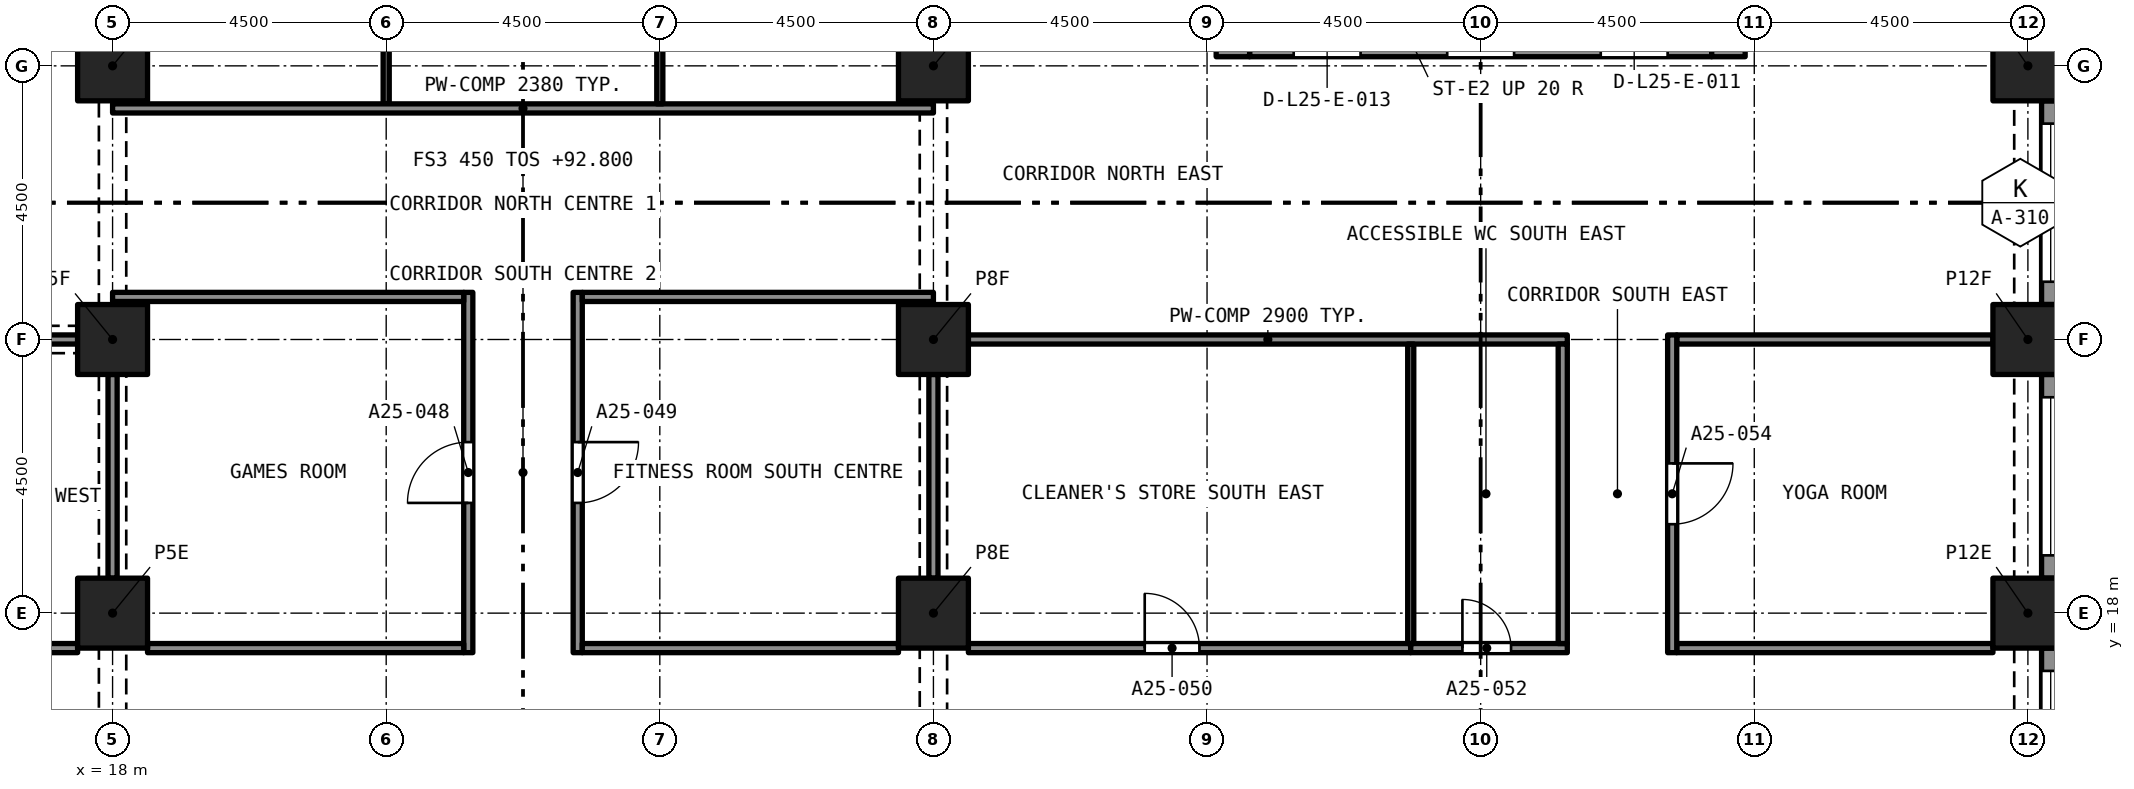
"""IFC4 building model, lengths in metres.
Left out: names, types, materials, properties, quantities, classifications, styles, units other than length and angle.
Written with IfcOpenShell. Run it as: python <this file> out.ifc"""

import sys

from ifc_helpers import new_model, si_unit, direction, frame, frame_2d, origin, origin_2d, place, context, subcontext, project, spatial, rectangle, extrude, element, fill, save


model = new_model("IFC4")
c1 = context("Model", 3, precision=1e-05, world=origin(), true_north=direction((0.0, 1.0)))
c2 = subcontext(c1, "Body", "Model", "MODEL_VIEW")
j1 = project(units=[si_unit("LENGTHUNIT", "METRE"), si_unit("PLANEANGLEUNIT", "RADIAN")], contexts=[c1])
p1 = place(None, origin())
s1 = spatial("IfcSite", under=j1, at=p1, CompositionType="ELEMENT")
p2 = place(p1, origin())
s2 = spatial("IfcBuilding", under=s1, at=p2, CompositionType="ELEMENT")
p3 = place(p2, frame((0.0, 0.0, 92.8)))
s3 = spatial("IfcBuildingStorey", under=s2, at=p3, CompositionType="ELEMENT", Elevation=92.8)
for number, where, z_axis, x_axis in (
    (1, (18.0, 18.0, 0.0), (0.0, 0.0, 1.0), (1.0, 0.0, 0.0)),
    (2, (31.5, 18.0, 0.0), (0.0, 0.0, 1.0), (1.0, 0.0, 0.0)),
    (3, (49.5, 18.0, 0.0), (0.0, 0.0, 1.0), (1.0, 0.0, 0.0)),
    (4, (18.0, 22.5, 0.0), (0.0, 0.0, 1.0), (1.0, 0.0, 0.0)),
    (5, (31.5, 22.5, 0.0), (0.0, 0.0, 1.0), (1.0, 0.0, 0.0)),
    (6, (49.5, 22.5, 0.0), (0.0, 0.0, 1.0), (1.0, 0.0, 0.0)),
    (7, (18.0, 27.0, 0.0), (0.0, 0.0, 1.0), (1.0, 0.0, 0.0)),
    (8, (31.5, 27.0, 0.0), (0.0, 0.0, 1.0), (1.0, 0.0, 0.0)),
    (9, (49.5, 27.0, 0.0), (0.0, 0.0, 1.0), (1.0, 0.0, 0.0)),
):
    element("IfcColumn", number, at=place(p3, frame(where, z_axis=z_axis, x_axis=x_axis)), inside=s3, PredefinedType="COLUMN", context=c2, shape_type="SweptSolid", body=[
        extrude(rectangle(XDim=1.15, YDim=1.15, at=origin_2d()), origin(), (0.0, 0.0, 1.0), 3.2),
    ])
p4 = place(p3, frame((36.7, 27.425, 0.0), z_axis=(0.0, 0.0, 1.0), x_axis=(1.0, 0.0, 0.0)))
e10 = element("IfcWall", 10, at=p4, inside=s3, PredefinedType="SOLIDWALL", context=c2, shape_type="SweptSolid", body=[
    extrude(rectangle(XDim=7.6, YDim=0.55, at=frame_2d((3.8, 0.0))), origin(), (0.0, 0.0, 1.0), 3.2),
])
p5 = place(p4, frame((5.775, 0.0, 0.0)))
e11 = element("IfcOpeningElement", 11, at=p5, cuts=e10, PredefinedType="OPENING", context=c2, shape_type="SweptSolid", body=[
    extrude(rectangle(XDim=1.1, YDim=2.1, at=frame_2d((0.55, 1.05))), frame((0.0, 0.285, 0.0), z_axis=(0.0, -1.0, 0.0), x_axis=(1.0, 0.0, 0.0)), (0.0, 0.0, 1.0), 0.57),
])
p6 = place(p4, frame((3.25, 0.0, 0.0)))
e12 = element("IfcOpeningElement", 12, at=p6, cuts=e10, PredefinedType="OPENING", context=c2, shape_type="SweptSolid", body=[
    extrude(rectangle(XDim=1.1, YDim=2.1, at=frame_2d((0.55, 1.05))), frame((0.0, 0.285, 0.0), z_axis=(0.0, -1.0, 0.0), x_axis=(1.0, 0.0, 0.0)), (0.0, 0.0, 1.0), 0.57),
])
p7 = place(p4, frame((0.725, 0.0, 0.0)))
e13 = element("IfcOpeningElement", 13, at=p7, cuts=e10, PredefinedType="OPENING", context=c2, shape_type="SweptSolid", body=[
    extrude(rectangle(XDim=1.1, YDim=2.1, at=frame_2d((0.55, 1.05))), frame((0.0, 0.285, 0.0), z_axis=(0.0, -1.0, 0.0), x_axis=(1.0, 0.0, 0.0)), (0.0, 0.0, 1.0), 0.57),
])
p8 = place(p3, frame((36.425, 27.15, 0.0), z_axis=(0.0, 0.0, 1.0), x_axis=(0.0, 1.0, 0.0)))
e14 = element("IfcWall", 14, at=p8, inside=s3, PredefinedType="SOLIDWALL", context=c2, shape_type="SweptSolid", body=[
    extrude(rectangle(XDim=13.2, YDim=0.55, at=frame_2d((6.6, 0.0))), origin(), (0.0, 0.0, 1.0), 3.2),
])
p9 = place(p8, frame((8.8, 0.0, 0.0)))
e15 = element("IfcOpeningElement", 15, at=p9, cuts=e14, PredefinedType="OPENING", context=c2, shape_type="SweptSolid", body=[
    extrude(rectangle(XDim=1.2, YDim=2.1, at=frame_2d((0.6, 1.05))), frame((0.0, 0.285, 0.0), z_axis=(0.0, -1.0, 0.0), x_axis=(1.0, 0.0, 0.0)), (0.0, 0.0, 1.0), 0.57),
])
p10 = place(p3, frame((44.575, 27.15, 0.0), z_axis=(0.0, 0.0, 1.0), x_axis=(0.0, 1.0, 0.0)))
e16 = element("IfcWall", 16, at=p10, inside=s3, PredefinedType="SOLIDWALL", context=c2, shape_type="SweptSolid", body=[
    extrude(rectangle(XDim=13.2, YDim=0.55, at=frame_2d((6.6, 0.0))), origin(), (0.0, 0.0, 1.0), 3.2),
])
p11 = place(p10, frame((8.8, 0.0, 0.0)))
e17 = element("IfcOpeningElement", 17, at=p11, cuts=e16, PredefinedType="OPENING", context=c2, shape_type="SweptSolid", body=[
    extrude(rectangle(XDim=1.2, YDim=2.1, at=frame_2d((0.6, 1.05))), frame((0.0, 0.285, 0.0), z_axis=(0.0, -1.0, 0.0), x_axis=(1.0, 0.0, 0.0)), (0.0, 0.0, 1.0), 0.57),
])
p12 = place(p3, frame((49.875, 17.425, 0.0), z_axis=(0.0, 0.0, 1.0), x_axis=(0.0, -1.0, 0.0)))
e18 = element("IfcWall", 18, at=p12, inside=s3, PredefinedType="SOLIDWALL", context=c2, shape_type="SweptSolid", body=[
    extrude(rectangle(XDim=3.35, YDim=0.3, at=frame_2d((1.675, 0.0))), origin(), (0.0, 0.0, 1.0), 3.2),
])
p13 = place(p12, frame((0.375, 0.0, 0.45)))
e19 = element("IfcOpeningElement", 19, at=p13, cuts=e18, PredefinedType="OPENING", context=c2, shape_type="SweptSolid", body=[
    extrude(rectangle(XDim=2.6, YDim=1.95, at=frame_2d((1.3, 0.975))), frame((0.0, 0.16, 0.0), z_axis=(0.0, -1.0, 0.0), x_axis=(1.0, 0.0, 0.0)), (0.0, 0.0, 1.0), 0.32),
])
p14 = place(p3, frame((49.875, 21.925, 0.0), z_axis=(0.0, 0.0, 1.0), x_axis=(0.0, -1.0, 0.0)))
e20 = element("IfcWall", 20, at=p14, inside=s3, PredefinedType="SOLIDWALL", context=c2, shape_type="SweptSolid", body=[
    extrude(rectangle(XDim=3.35, YDim=0.3, at=frame_2d((1.675, 0.0))), origin(), (0.0, 0.0, 1.0), 3.2),
])
p15 = place(p14, frame((0.375, 0.0, 0.45)))
e21 = element("IfcOpeningElement", 21, at=p15, cuts=e20, PredefinedType="OPENING", context=c2, shape_type="SweptSolid", body=[
    extrude(rectangle(XDim=2.6, YDim=1.95, at=frame_2d((1.3, 0.975))), frame((0.0, 0.16, 0.0), z_axis=(0.0, -1.0, 0.0), x_axis=(1.0, 0.0, 0.0)), (0.0, 0.0, 1.0), 0.32),
])
p16 = place(p3, frame((49.875, 26.425, 0.0), z_axis=(0.0, 0.0, 1.0), x_axis=(0.0, -1.0, 0.0)))
e22 = element("IfcWall", 22, at=p16, inside=s3, PredefinedType="SOLIDWALL", context=c2, shape_type="SweptSolid", body=[
    extrude(rectangle(XDim=3.35, YDim=0.3, at=frame_2d((1.675, 0.0))), origin(), (0.0, 0.0, 1.0), 3.2),
])
p17 = place(p16, frame((0.375, 0.0, 0.45)))
e23 = element("IfcOpeningElement", 23, at=p17, cuts=e22, PredefinedType="OPENING", context=c2, shape_type="SweptSolid", body=[
    extrude(rectangle(XDim=2.6, YDim=1.95, at=frame_2d((1.3, 0.975))), frame((0.0, 0.16, 0.0), z_axis=(0.0, -1.0, 0.0), x_axis=(1.0, 0.0, 0.0)), (0.0, 0.0, 1.0), 0.32),
])
p18 = place(p3, frame((23.85, 17.35, 0.0), z_axis=(0.0, 0.0, 1.0), x_axis=(0.0, 1.0, 0.0)))
e24 = element("IfcWall", 24, at=p18, inside=s3, PredefinedType="PARTITIONING", context=c2, shape_type="SweptSolid", body=[
    extrude(rectangle(XDim=5.925, YDim=0.15, at=frame_2d((2.962, 0.0))), origin(), (0.0, 0.0, 1.0), 2.75),
])
p19 = place(p18, frame((2.462, 0.0, 0.0)))
e25 = element("IfcOpeningElement", 25, at=p19, cuts=e24, PredefinedType="OPENING", context=c2, shape_type="SweptSolid", body=[
    extrude(rectangle(XDim=1.0, YDim=2.1, at=frame_2d((0.5, 1.05))), frame((0.0, 0.085, 0.0), z_axis=(0.0, -1.0, 0.0), x_axis=(1.0, 0.0, 0.0)), (0.0, 0.0, 1.0), 0.17),
])
p20 = place(p3, frame((25.65, 23.275, 0.0), z_axis=(0.0, 0.0, 1.0), x_axis=(0.0, -1.0, 0.0)))
e26 = element("IfcWall", 26, at=p20, inside=s3, PredefinedType="PARTITIONING", context=c2, shape_type="SweptSolid", body=[
    extrude(rectangle(XDim=5.925, YDim=0.15, at=frame_2d((2.962, 0.0))), origin(), (0.0, 0.0, 1.0), 2.75),
])
p21 = place(p20, frame((2.462, 0.0, 0.0)))
e27 = element("IfcOpeningElement", 27, at=p21, cuts=e26, PredefinedType="OPENING", context=c2, shape_type="SweptSolid", body=[
    extrude(rectangle(XDim=1.0, YDim=2.1, at=frame_2d((0.5, 1.05))), frame((0.0, 0.085, 0.0), z_axis=(0.0, -1.0, 0.0), x_axis=(1.0, 0.0, 0.0)), (0.0, 0.0, 1.0), 0.17),
])
for number, where, z_axis, x_axis in (
    (28, (18.575, 17.425, 0.0), (0.0, 0.0, 1.0), (1.0, 0.0, 0.0)),
    (29, (25.725, 17.425, 0.0), (0.0, 0.0, 1.0), (1.0, 0.0, 0.0)),
):
    element("IfcWall", number, at=place(p3, frame(where, z_axis=z_axis, x_axis=x_axis)), inside=s3, PredefinedType="PARTITIONING", context=c2, shape_type="SweptSolid", body=[
        extrude(rectangle(XDim=5.2, YDim=0.15, at=frame_2d((2.6, 0.0))), origin(), (0.0, 0.0, 1.0), 2.75),
    ])
p22 = place(p3, frame((32.075, 17.425, 0.0), z_axis=(0.0, 0.0, 1.0), x_axis=(1.0, 0.0, 0.0)))
e30 = element("IfcWall", 30, at=p22, inside=s3, PredefinedType="PARTITIONING", context=c2, shape_type="SweptSolid", body=[
    extrude(rectangle(XDim=7.275, YDim=0.15, at=frame_2d((3.638, 0.0))), origin(), (0.0, 0.0, 1.0), 2.9),
])
p23 = place(p22, frame((2.9, 0.0, 0.0)))
e31 = element("IfcOpeningElement", 31, at=p23, cuts=e30, PredefinedType="OPENING", context=c2, shape_type="SweptSolid", body=[
    extrude(rectangle(XDim=0.9, YDim=2.1, at=frame_2d((0.45, 1.05))), frame((0.0, 0.085, 0.0), z_axis=(0.0, -1.0, 0.0), x_axis=(1.0, 0.0, 0.0)), (0.0, 0.0, 1.0), 0.17),
])
p24 = place(p3, frame((10.15, 17.425, 0.0), z_axis=(0.0, 0.0, 1.0), x_axis=(1.0, 0.0, 0.0)))
e32 = element("IfcWall", 32, at=p24, inside=s3, PredefinedType="PARTITIONING", context=c2, shape_type="SweptSolid", body=[
    extrude(rectangle(XDim=7.275, YDim=0.15, at=frame_2d((3.638, 0.0))), origin(), (0.0, 0.0, 1.0), 2.9),
])
p25 = place(p24, frame((3.475, 0.0, 0.0)))
e33 = element("IfcOpeningElement", 33, at=p25, cuts=e32, PredefinedType="OPENING", context=c2, shape_type="SweptSolid", body=[
    extrude(rectangle(XDim=0.9, YDim=2.1, at=frame_2d((0.45, 1.05))), frame((0.0, 0.085, 0.0), z_axis=(0.0, -1.0, 0.0), x_axis=(1.0, 0.0, 0.0)), (0.0, 0.0, 1.0), 0.17),
])
p26 = place(p3, frame((39.35, 17.425, 0.0), z_axis=(0.0, 0.0, 1.0), x_axis=(1.0, 0.0, 0.0)))
e34 = element("IfcWall", 34, at=p26, inside=s3, PredefinedType="PARTITIONING", context=c2, shape_type="SweptSolid", body=[
    extrude(rectangle(XDim=2.575, YDim=0.15, at=frame_2d((1.288, 0.0))), origin(), (0.0, 0.0, 1.0), 2.9),
])
p27 = place(p26, frame((0.85, 0.0, 0.0)))
e35 = element("IfcOpeningElement", 35, at=p27, cuts=e34, PredefinedType="OPENING", context=c2, shape_type="SweptSolid", body=[
    extrude(rectangle(XDim=0.8, YDim=2.1, at=frame_2d((0.4, 1.05))), frame((0.0, 0.085, 0.0), z_axis=(0.0, -1.0, 0.0), x_axis=(1.0, 0.0, 0.0)), (0.0, 0.0, 1.0), 0.17),
])
p28 = place(p3, frame((43.725, 17.425, 0.0), z_axis=(0.0, 0.0, 1.0), x_axis=(1.0, 0.0, 0.0)))
e36 = element("IfcWall", 36, at=p28, inside=s3, PredefinedType="PARTITIONING", context=c2, shape_type="SweptSolid", body=[
    extrude(rectangle(XDim=5.2, YDim=0.15, at=frame_2d((2.6, 0.0))), origin(), (0.0, 0.0, 1.0), 2.9),
])
p29 = place(p3, frame((22.5, 26.375, 0.0), z_axis=(0.0, 0.0, 1.0), x_axis=(0.0, 1.0, 0.0)))
e37 = element("IfcWall", 37, at=p29, inside=s3, PredefinedType="PARTITIONING", context=c2, shape_type="SweptSolid", body=[
    extrude(rectangle(XDim=10.125, YDim=0.1, at=frame_2d((5.062, 0.0))), origin(), (0.0, 0.0, 1.0), 2.75),
])
p30 = place(p3, frame((18.0, 26.3, 0.0), z_axis=(0.0, 0.0, 1.0), x_axis=(1.0, 0.0, 0.0)))
e38 = element("IfcWall", 38, at=p30, inside=s3, PredefinedType="PARTITIONING", context=c2, shape_type="SweptSolid", body=[
    extrude(rectangle(XDim=13.5, YDim=0.15, at=frame_2d((6.75, 0.0))), origin(), (0.0, 0.0, 1.0), 2.38),
])
p31 = place(p3, frame((27.0, 26.375, 0.0), z_axis=(0.0, 0.0, 1.0), x_axis=(0.0, 1.0, 0.0)))
e39 = element("IfcWall", 39, at=p31, inside=s3, PredefinedType="PARTITIONING", context=c2, shape_type="SweptSolid", body=[
    extrude(rectangle(XDim=10.125, YDim=0.1, at=frame_2d((5.062, 0.0))), origin(), (0.0, 0.0, 1.0), 2.75),
])
p32 = place(p3, frame((18.0, 23.2, 0.0), z_axis=(0.0, 0.0, 1.0), x_axis=(1.0, 0.0, 0.0)))
e40 = element("IfcWall", 40, at=p32, inside=s3, PredefinedType="PARTITIONING", context=c2, shape_type="SweptSolid", body=[
    extrude(rectangle(XDim=5.775, YDim=0.15, at=frame_2d((2.887, 0.0))), origin(), (0.0, 0.0, 1.0), 2.75),
])
p33 = place(p3, frame((18.0, 18.575, 0.0), z_axis=(0.0, 0.0, 1.0), x_axis=(0.0, 1.0, 0.0)))
e41 = element("IfcWall", 41, at=p33, inside=s3, PredefinedType="PARTITIONING", context=c2, shape_type="SweptSolid", body=[
    extrude(rectangle(XDim=3.35, YDim=0.15, at=frame_2d((1.675, 0.0))), origin(), (0.0, 0.0, 1.0), 2.38),
])
p34 = place(p3, frame((25.725, 23.2, 0.0), z_axis=(0.0, 0.0, 1.0), x_axis=(1.0, 0.0, 0.0)))
e42 = element("IfcWall", 42, at=p34, inside=s3, PredefinedType="PARTITIONING", context=c2, shape_type="SweptSolid", body=[
    extrude(rectangle(XDim=5.775, YDim=0.15, at=frame_2d((2.887, 0.0))), origin(), (0.0, 0.0, 1.0), 2.75),
])
p35 = place(p3, frame((31.5, 18.575, 0.0), z_axis=(0.0, 0.0, 1.0), x_axis=(0.0, 1.0, 0.0)))
e43 = element("IfcWall", 43, at=p35, inside=s3, PredefinedType="PARTITIONING", context=c2, shape_type="SweptSolid", body=[
    extrude(rectangle(XDim=3.35, YDim=0.15, at=frame_2d((1.675, 0.0))), origin(), (0.0, 0.0, 1.0), 2.38),
])
p36 = place(p3, frame((32.075, 22.5, 0.0), z_axis=(0.0, 0.0, 1.0), x_axis=(1.0, 0.0, 0.0)))
e44 = element("IfcWall", 44, at=p36, inside=s3, PredefinedType="PARTITIONING", context=c2, shape_type="SweptSolid", body=[
    extrude(rectangle(XDim=9.85, YDim=0.15, at=frame_2d((4.925, 0.0))), origin(), (0.0, 0.0, 1.0), 2.9),
])
p37 = place(p3, frame((43.725, 22.5, 0.0), z_axis=(0.0, 0.0, 1.0), x_axis=(1.0, 0.0, 0.0)))
e45 = element("IfcWall", 45, at=p37, inside=s3, PredefinedType="PARTITIONING", context=c2, shape_type="SweptSolid", body=[
    extrude(rectangle(XDim=5.2, YDim=0.15, at=frame_2d((2.6, 0.0))), origin(), (0.0, 0.0, 1.0), 2.9),
])
p38 = place(p3, frame((14.075, 22.5, 0.0), z_axis=(0.0, 0.0, 1.0), x_axis=(1.0, 0.0, 0.0)))
e46 = element("IfcWall", 46, at=p38, inside=s3, PredefinedType="PARTITIONING", context=c2, shape_type="SweptSolid", body=[
    extrude(rectangle(XDim=3.35, YDim=0.15, at=frame_2d((1.675, 0.0))), origin(), (0.0, 0.0, 1.0), 2.38),
])
p39 = place(p3, frame((41.85, 17.5, 0.0), z_axis=(0.0, 0.0, 1.0), x_axis=(0.0, 1.0, 0.0)))
e47 = element("IfcWall", 47, at=p39, inside=s3, PredefinedType="PARTITIONING", context=c2, shape_type="SweptSolid", body=[
    extrude(rectangle(XDim=4.925, YDim=0.15, at=frame_2d((2.462, 0.0))), origin(), (0.0, 0.0, 1.0), 2.9),
])
p40 = place(p3, frame((43.65, 22.575, 0.0), z_axis=(0.0, 0.0, 1.0), x_axis=(0.0, -1.0, 0.0)))
e48 = element("IfcWall", 48, at=p40, inside=s3, PredefinedType="PARTITIONING", context=c2, shape_type="SweptSolid", body=[
    extrude(rectangle(XDim=5.225, YDim=0.15, at=frame_2d((2.612, 0.0))), origin(), (0.0, 0.0, 1.0), 2.9),
])
p41 = place(p40, frame((2.113, 0.0, 0.0)))
e49 = element("IfcOpeningElement", 49, at=p41, cuts=e48, PredefinedType="OPENING", context=c2, shape_type="SweptSolid", body=[
    extrude(rectangle(XDim=1.0, YDim=2.1, at=frame_2d((0.5, 1.05))), frame((0.0, 0.085, 0.0), z_axis=(0.0, -1.0, 0.0), x_axis=(1.0, 0.0, 0.0)), (0.0, 0.0, 1.0), 0.17),
])
p42 = place(p3, frame((39.35, 17.5, 0.0), z_axis=(0.0, 0.0, 1.0), x_axis=(0.0, 1.0, 0.0)))
e50 = element("IfcWall", 50, at=p42, inside=s3, PredefinedType="PARTITIONING", context=c2, shape_type="SweptSolid", body=[
    extrude(rectangle(XDim=4.925, YDim=0.1, at=frame_2d((2.462, 0.0))), origin(), (0.0, 0.0, 1.0), 2.9),
])
p43 = place(p13, origin())
e51 = element("IfcWindow", 51, at=p43, inside=s3, PartitioningType="SINGLE_PANEL", PredefinedType="WINDOW", context=c2, shape_type="SweptSolid", body=[
    extrude(rectangle(XDim=2.6, YDim=1.95, at=frame_2d((1.3, 0.975))), frame((0.0, 0.03, 0.0), z_axis=(0.0, -1.0, 0.0), x_axis=(1.0, 0.0, 0.0)), (0.0, 0.0, 1.0), 0.06),
])
fill(e19, e51)
p44 = place(p15, origin())
e52 = element("IfcWindow", 52, at=p44, inside=s3, PartitioningType="SINGLE_PANEL", PredefinedType="WINDOW", context=c2, shape_type="SweptSolid", body=[
    extrude(rectangle(XDim=2.6, YDim=1.95, at=frame_2d((1.3, 0.975))), frame((0.0, 0.03, 0.0), z_axis=(0.0, -1.0, 0.0), x_axis=(1.0, 0.0, 0.0)), (0.0, 0.0, 1.0), 0.06),
])
fill(e21, e52)
p45 = place(p17, origin())
e53 = element("IfcWindow", 53, at=p45, inside=s3, PartitioningType="SINGLE_PANEL", PredefinedType="WINDOW", context=c2, shape_type="SweptSolid", body=[
    extrude(rectangle(XDim=2.6, YDim=1.95, at=frame_2d((1.3, 0.975))), frame((0.0, 0.03, 0.0), z_axis=(0.0, -1.0, 0.0), x_axis=(1.0, 0.0, 0.0)), (0.0, 0.0, 1.0), 0.06),
])
fill(e23, e53)
p46 = place(p19, origin())
e54 = element("IfcDoor", 54, at=p46, inside=s3, OperationType="SINGLE_SWING_RIGHT", PredefinedType="DOOR", context=c2, shape_type="SweptSolid", body=[
    extrude(rectangle(XDim=1.0, YDim=2.1, at=frame_2d((0.5, 1.05))), frame((0.0, 0.025, 0.0), z_axis=(0.0, -1.0, 0.0), x_axis=(1.0, 0.0, 0.0)), (0.0, 0.0, 1.0), 0.05),
])
fill(e25, e54)
p47 = place(p21, origin())
e55 = element("IfcDoor", 55, at=p47, inside=s3, OperationType="SINGLE_SWING_RIGHT", PredefinedType="DOOR", context=c2, shape_type="SweptSolid", body=[
    extrude(rectangle(XDim=1.0, YDim=2.1, at=frame_2d((0.5, 1.05))), frame((0.0, 0.025, 0.0), z_axis=(0.0, -1.0, 0.0), x_axis=(1.0, 0.0, 0.0)), (0.0, 0.0, 1.0), 0.05),
])
fill(e27, e55)
p48 = place(p23, origin())
e56 = element("IfcDoor", 56, at=p48, inside=s3, OperationType="SINGLE_SWING_LEFT", PredefinedType="DOOR", context=c2, shape_type="SweptSolid", body=[
    extrude(rectangle(XDim=0.9, YDim=2.1, at=frame_2d((0.45, 1.05))), frame((0.0, 0.025, 0.0), z_axis=(0.0, -1.0, 0.0), x_axis=(1.0, 0.0, 0.0)), (0.0, 0.0, 1.0), 0.05),
])
fill(e31, e56)
p49 = place(p27, origin())
e57 = element("IfcDoor", 57, at=p49, inside=s3, OperationType="SINGLE_SWING_LEFT", PredefinedType="DOOR", context=c2, shape_type="SweptSolid", body=[
    extrude(rectangle(XDim=0.8, YDim=2.1, at=frame_2d((0.4, 1.05))), frame((0.0, 0.025, 0.0), z_axis=(0.0, -1.0, 0.0), x_axis=(1.0, 0.0, 0.0)), (0.0, 0.0, 1.0), 0.05),
])
fill(e35, e57)
p50 = place(p41, origin())
e58 = element("IfcDoor", 58, at=p50, inside=s3, OperationType="SINGLE_SWING_RIGHT", PredefinedType="DOOR", context=c2, shape_type="SweptSolid", body=[
    extrude(rectangle(XDim=1.0, YDim=2.1, at=frame_2d((0.5, 1.05))), frame((0.0, 0.025, 0.0), z_axis=(0.0, -1.0, 0.0), x_axis=(1.0, 0.0, 0.0)), (0.0, 0.0, 1.0), 0.05),
])
fill(e49, e58)
save(model, sys.argv[1])
